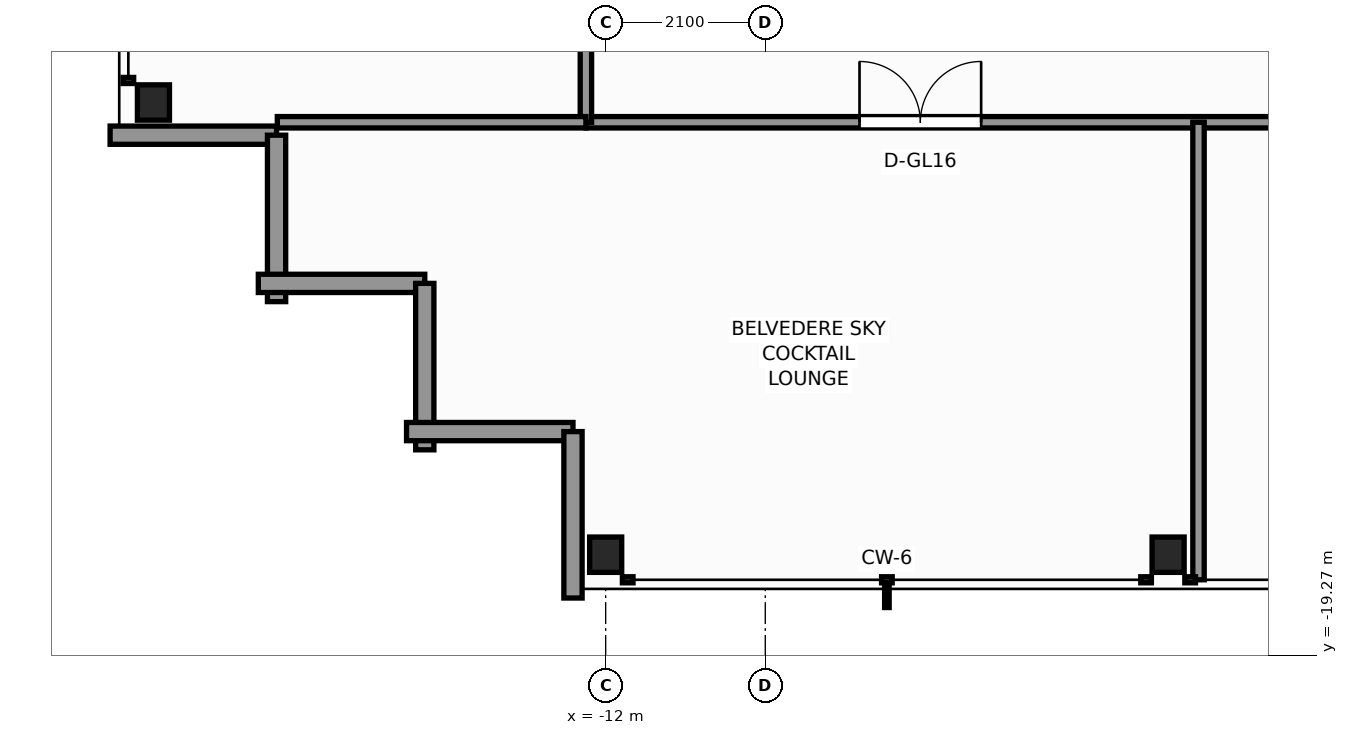
"""IFC4 building model, lengths in metres.
Left out: names, types, materials, properties, quantities, classifications, styles, units other than length and angle.
Written with IfcOpenShell. Run it as: python <this file> out.ifc"""

import sys

from ifc_helpers import new_model, si_unit, direction, frame, frame_2d, origin, origin_2d, place, context, subcontext, project, spatial, rectangle, i_section, extrude, element, fill, save


model = new_model("IFC4")
c1 = context("Model", 3, precision=1e-05, world=origin(), true_north=direction((0.0, 1.0)))
c2 = subcontext(c1, "Body", "Model", "MODEL_VIEW")
j1 = project(units=[si_unit("LENGTHUNIT", "METRE"), si_unit("PLANEANGLEUNIT", "RADIAN")], contexts=[c1])
p1 = place(None, origin())
s1 = spatial("IfcSite", under=j1, at=p1, CompositionType="ELEMENT")
p2 = place(p1, origin())
s2 = spatial("IfcBuilding", under=s1, at=p2, CompositionType="ELEMENT")
p3 = place(p2, frame((0.0, 0.0, 258.4)))
s3 = spatial("IfcBuildingStorey", under=s2, at=p3, CompositionType="ELEMENT", Elevation=258.4)
for number, where, z_axis, x_axis in (
    (1, (-12.0, -17.95, 0.0), (0.0, 0.0, 1.0), (1.0, 0.0, 0.0)),
    (2, (-4.6, -17.95, 0.0), (0.0, 0.0, 1.0), (1.0, 0.0, 0.0)),
    (3, (-17.95, -12.0, 0.0), (0.0, 0.0, 1.0), (1.0, 0.0, 0.0)),
):
    element("IfcColumn", number, at=place(p3, frame(where, z_axis=z_axis, x_axis=x_axis)), inside=s3, PredefinedType="COLUMN", context=c2, shape_type="SweptSolid", body=[
        extrude(i_section(OverallWidth=0.422, OverallDepth=0.465, WebThickness=0.045, FlangeThickness=0.073, FilletRadius=0.025, at=origin_2d()), origin(), (0.0, 0.0, 1.0), 4.4),
    ])
p4 = place(p3, frame((-16.33, -12.43, 0.0), z_axis=(0.0, 0.0, 1.0), x_axis=(-1.0, 0.0, 0.0)))
e4 = element("IfcWall", 4, at=p4, inside=s3, PredefinedType="STANDARD", context=c2, shape_type="SweptSolid", body=[
    extrude(rectangle(XDim=2.19, YDim=0.24, at=frame_2d((1.095, 0.0))), origin(), (0.0, 0.0, 1.0), 3.503),
])
for number, where, z_axis, x_axis in (
    (5, (-16.33, -14.62, 0.0), (0.0, 0.0, 1.0), (0.0, 1.0, 0.0)),
    (6, (-14.38, -14.38, 0.0), (0.0, 0.0, 1.0), (-1.0, 0.0, 0.0)),
    (7, (-14.38, -16.57, 0.0), (0.0, 0.0, 1.0), (0.0, 1.0, 0.0)),
    (8, (-12.43, -16.33, 0.0), (0.0, 0.0, 1.0), (-1.0, 0.0, 0.0)),
):
    element("IfcWall", number, at=place(p3, frame(where, z_axis=z_axis, x_axis=x_axis)), inside=s3, PredefinedType="STANDARD", context=c2, shape_type="SweptSolid", body=[
        extrude(rectangle(XDim=2.19, YDim=0.24, at=frame_2d((1.095, 0.0))), origin(), (0.0, 0.0, 1.0), 3.503),
    ])
p5 = place(p3, frame((-12.43, -18.52, 0.0), z_axis=(0.0, 0.0, 1.0), x_axis=(0.0, 1.0, 0.0)))
e9 = element("IfcWall", 9, at=p5, inside=s3, PredefinedType="STANDARD", context=c2, shape_type="SweptSolid", body=[
    extrude(rectangle(XDim=2.19, YDim=0.24, at=frame_2d((1.095, 0.0))), origin(), (0.0, 0.0, 1.0), 3.503),
])
p6 = place(p3, frame((-12.26, -12.26, 0.0), z_axis=(0.0, 0.0, 1.0), x_axis=(1.0, 0.0, 0.0)))
e10 = element("IfcWall", 10, at=p6, inside=s3, PredefinedType="PARTITIONING", context=c2, shape_type="SweptSolid", body=[
    extrude(rectangle(XDim=24.52, YDim=0.15, at=frame_2d((12.26, 0.0))), origin(), (0.0, 0.0, 1.0), 3.409),
])
p7 = place(p6, frame((3.6, 0.0, 0.0)))
e11 = element("IfcOpeningElement", 11, at=p7, cuts=e10, PredefinedType="OPENING", context=c2, shape_type="SweptSolid", body=[
    extrude(rectangle(XDim=1.6, YDim=2.3, at=frame_2d((0.8, 1.15))), frame((0.0, 0.085, 0.0), z_axis=(0.0, -1.0, 0.0), x_axis=(1.0, 0.0, 0.0)), (0.0, 0.0, 1.0), 0.17),
])
p8 = place(p6, frame((11.26, 0.0, 0.0)))
e12 = element("IfcOpeningElement", 12, at=p8, cuts=e10, PredefinedType="OPENING", context=c2, shape_type="SweptSolid", body=[
    extrude(rectangle(XDim=1.2, YDim=2.2, at=frame_2d((0.6, 1.1))), frame((0.0, 0.085, 0.0), z_axis=(0.0, -1.0, 0.0), x_axis=(1.0, 0.0, 0.0)), (0.0, 0.0, 1.0), 0.17),
])
p9 = place(p3, frame((-12.26, -12.26, 0.0), z_axis=(0.0, 0.0, 1.0), x_axis=(0.0, 1.0, 0.0)))
e13 = element("IfcWall", 13, at=p9, inside=s3, PredefinedType="PARTITIONING", context=c2, shape_type="SweptSolid", body=[
    extrude(rectangle(XDim=24.52, YDim=0.15, at=frame_2d((12.26, 0.0))), origin(), (0.0, 0.0, 1.0), 3.409),
])
p10 = place(p9, frame((11.5, 0.0, 0.0)))
e14 = element("IfcOpeningElement", 14, at=p10, cuts=e13, PredefinedType="OPENING", context=c2, shape_type="SweptSolid", body=[
    extrude(rectangle(XDim=1.2, YDim=2.2, at=frame_2d((0.6, 1.1))), frame((0.0, 0.085, 0.0), z_axis=(0.0, -1.0, 0.0), x_axis=(1.0, 0.0, 0.0)), (0.0, 0.0, 1.0), 0.17),
])
p11 = place(p3, frame((-16.32, -12.26, 0.0), z_axis=(0.0, 0.0, 1.0), x_axis=(1.0, 0.0, 0.0)))
e15 = element("IfcWall", 15, at=p11, inside=s3, PredefinedType="PARTITIONING", context=c2, shape_type="SweptSolid", body=[
    extrude(rectangle(XDim=4.06, YDim=0.15, at=frame_2d((2.03, 0.0))), origin(), (0.0, 0.0, 1.0), 4.12),
])
p12 = place(p3, frame((-4.2, -18.28, 0.0), z_axis=(0.0, 0.0, 1.0), x_axis=(0.0, 1.0, 0.0)))
e16 = element("IfcWall", 16, at=p12, inside=s3, PredefinedType="PARTITIONING", context=c2, shape_type="SweptSolid", body=[
    extrude(rectangle(XDim=6.02, YDim=0.15, at=frame_2d((3.01, 0.0))), origin(), (0.0, 0.0, 1.0), 3.493),
])
p13 = place(p7, origin())
e17 = element("IfcDoor", 17, at=p13, inside=s3, OperationType="DOUBLE_DOOR_SINGLE_SWING", PredefinedType="DOOR", context=c2, shape_type="SweptSolid", body=[
    extrude(rectangle(XDim=1.6, YDim=2.3, at=frame_2d((0.8, 1.15))), frame((0.0, 0.025, 0.0), z_axis=(0.0, -1.0, 0.0), x_axis=(1.0, 0.0, 0.0)), (0.0, 0.0, 1.0), 0.05),
])
fill(e11, e17)
save(model, sys.argv[1])
